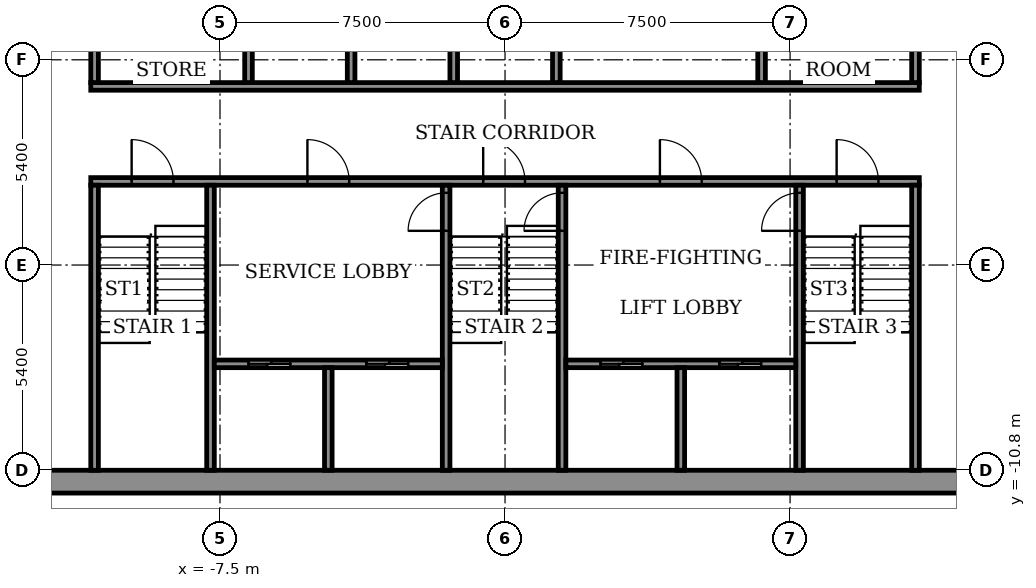
"""IFC4 building model, lengths in metres.
Left out: names, types, materials, properties, quantities, classifications, styles, units other than length and angle.
Written with IfcOpenShell. Run it as: python <this file> out.ifc"""

import sys

from ifc_helpers import new_model, si_unit, direction, frame, frame_2d, origin, place, context, subcontext, project, spatial, rectangle, extrude, element, fill, save


model = new_model("IFC4")
c1 = context("Model", 3, precision=1e-05, world=origin(), true_north=direction((0.0, 1.0)))
c2 = subcontext(c1, "Body", "Model", "MODEL_VIEW")
j1 = project(units=[si_unit("LENGTHUNIT", "METRE"), si_unit("PLANEANGLEUNIT", "RADIAN")], contexts=[c1])
p1 = place(None, origin())
s1 = spatial("IfcSite", under=j1, at=p1, CompositionType="ELEMENT")
p2 = place(p1, origin())
s2 = spatial("IfcBuilding", under=s1, at=p2, CompositionType="ELEMENT")
p3 = place(p2, frame((0.0, 0.0, 309.7)))
s3 = spatial("IfcBuildingStorey", under=s2, at=p3, CompositionType="ELEMENT", Elevation=309.7)
p4 = place(p3, frame((-14.4, -11.1, 0.0), z_axis=(0.0, 0.0, 1.0), x_axis=(1.0, 0.0, 0.0)))
e1 = element("IfcWall", 1, at=p4, inside=s3, PredefinedType="SHEAR", context=c2, shape_type="SweptSolid", body=[
    extrude(rectangle(XDim=28.8, YDim=0.6, at=frame_2d((14.4, 0.0))), origin(), (0.0, 0.0, 1.0), 3.6),
])
p5 = place(p3, frame((-10.9, -3.2, 0.0), z_axis=(0.0, 0.0, 1.0), x_axis=(1.0, 0.0, 0.0)))
e2 = element("IfcWall", 2, at=p5, inside=s3, PredefinedType="SHEAR", context=c2, shape_type="SweptSolid", body=[
    extrude(rectangle(XDim=21.8, YDim=0.2, at=frame_2d((10.9, 0.0))), origin(), (0.0, 0.0, 1.0), 3.05),
])
p6 = place(p5, frame((1.075, 0.0, 0.0)))
e3 = element("IfcOpeningElement", 3, at=p6, cuts=e2, PredefinedType="OPENING", context=c2, shape_type="SweptSolid", body=[
    extrude(rectangle(XDim=1.1, YDim=2.1, at=frame_2d((0.55, 1.05))), frame((0.0, 0.11, 0.0), z_axis=(0.0, -1.0, 0.0), x_axis=(1.0, 0.0, 0.0)), (0.0, 0.0, 1.0), 0.22),
])
p7 = place(p5, frame((10.325, 0.0, 0.0)))
e4 = element("IfcOpeningElement", 4, at=p7, cuts=e2, PredefinedType="OPENING", context=c2, shape_type="SweptSolid", body=[
    extrude(rectangle(XDim=1.1, YDim=2.1, at=frame_2d((0.55, 1.05))), frame((0.0, 0.11, 0.0), z_axis=(0.0, -1.0, 0.0), x_axis=(1.0, 0.0, 0.0)), (0.0, 0.0, 1.0), 0.22),
])
p8 = place(p5, frame((19.625, 0.0, 0.0)))
e5 = element("IfcOpeningElement", 5, at=p8, cuts=e2, PredefinedType="OPENING", context=c2, shape_type="SweptSolid", body=[
    extrude(rectangle(XDim=1.1, YDim=2.1, at=frame_2d((0.55, 1.05))), frame((0.0, 0.11, 0.0), z_axis=(0.0, -1.0, 0.0), x_axis=(1.0, 0.0, 0.0)), (0.0, 0.0, 1.0), 0.22),
])
p9 = place(p5, frame((5.7, 0.0, 0.0)))
e6 = element("IfcOpeningElement", 6, at=p9, cuts=e2, PredefinedType="OPENING", context=c2, shape_type="SweptSolid", body=[
    extrude(rectangle(XDim=1.1, YDim=2.1, at=frame_2d((0.55, 1.05))), frame((0.0, 0.11, 0.0), z_axis=(0.0, -1.0, 0.0), x_axis=(1.0, 0.0, 0.0)), (0.0, 0.0, 1.0), 0.22),
])
p10 = place(p5, frame((14.975, 0.0, 0.0)))
e7 = element("IfcOpeningElement", 7, at=p10, cuts=e2, PredefinedType="OPENING", context=c2, shape_type="SweptSolid", body=[
    extrude(rectangle(XDim=1.1, YDim=2.1, at=frame_2d((0.55, 1.05))), frame((0.0, 0.11, 0.0), z_axis=(0.0, -1.0, 0.0), x_axis=(1.0, 0.0, 0.0)), (0.0, 0.0, 1.0), 0.22),
])
p11 = place(p3, frame((-10.9, -0.7, 0.0), z_axis=(0.0, 0.0, 1.0), x_axis=(1.0, 0.0, 0.0)))
e8 = element("IfcWall", 8, at=p11, inside=s3, PredefinedType="SHEAR", context=c2, shape_type="SweptSolid", body=[
    extrude(rectangle(XDim=21.8, YDim=0.2, at=frame_2d((10.9, 0.0))), origin(), (0.0, 0.0, 1.0), 3.05),
])
for number, where, z_axis, x_axis in (
    (9, (-10.8, -10.8, 0.0), (0.0, 0.0, 1.0), (0.0, 1.0, 0.0)),
    (10, (-7.75, -10.8, 0.0), (0.0, 0.0, 1.0), (0.0, 1.0, 0.0)),
):
    element("IfcWall", number, at=place(p3, frame(where, z_axis=z_axis, x_axis=x_axis)), inside=s3, PredefinedType="SHEAR", context=c2, shape_type="SweptSolid", body=[
        extrude(rectangle(XDim=7.5, YDim=0.2, at=frame_2d((3.75, 0.0))), origin(), (0.0, 0.0, 1.0), 3.05),
    ])
p12 = place(p3, frame((-1.55, -10.8, 0.0), z_axis=(0.0, 0.0, 1.0), x_axis=(0.0, 1.0, 0.0)))
e11 = element("IfcWall", 11, at=p12, inside=s3, PredefinedType="SHEAR", context=c2, shape_type="SweptSolid", body=[
    extrude(rectangle(XDim=7.5, YDim=0.2, at=frame_2d((3.75, 0.0))), origin(), (0.0, 0.0, 1.0), 3.05),
])
p13 = place(p12, frame((6.3, 0.0, 0.0)))
e12 = element("IfcOpeningElement", 12, at=p13, cuts=e11, PredefinedType="OPENING", context=c2, shape_type="SweptSolid", body=[
    extrude(rectangle(XDim=1.0, YDim=2.1, at=frame_2d((0.5, 1.05))), frame((0.0, 0.11, 0.0), z_axis=(0.0, -1.0, 0.0), x_axis=(1.0, 0.0, 0.0)), (0.0, 0.0, 1.0), 0.22),
])
p14 = place(p3, frame((1.5, -10.8, 0.0), z_axis=(0.0, 0.0, 1.0), x_axis=(0.0, 1.0, 0.0)))
e13 = element("IfcWall", 13, at=p14, inside=s3, PredefinedType="SHEAR", context=c2, shape_type="SweptSolid", body=[
    extrude(rectangle(XDim=7.5, YDim=0.2, at=frame_2d((3.75, 0.0))), origin(), (0.0, 0.0, 1.0), 3.05),
])
p15 = place(p14, frame((6.3, 0.0, 0.0)))
e14 = element("IfcOpeningElement", 14, at=p15, cuts=e13, PredefinedType="OPENING", context=c2, shape_type="SweptSolid", body=[
    extrude(rectangle(XDim=1.0, YDim=2.1, at=frame_2d((0.5, 1.05))), frame((0.0, 0.11, 0.0), z_axis=(0.0, -1.0, 0.0), x_axis=(1.0, 0.0, 0.0)), (0.0, 0.0, 1.0), 0.22),
])
p16 = place(p3, frame((7.75, -10.8, 0.0), z_axis=(0.0, 0.0, 1.0), x_axis=(0.0, 1.0, 0.0)))
e15 = element("IfcWall", 15, at=p16, inside=s3, PredefinedType="SHEAR", context=c2, shape_type="SweptSolid", body=[
    extrude(rectangle(XDim=7.5, YDim=0.2, at=frame_2d((3.75, 0.0))), origin(), (0.0, 0.0, 1.0), 3.05),
])
p17 = place(p16, frame((6.3, 0.0, 0.0)))
e16 = element("IfcOpeningElement", 16, at=p17, cuts=e15, PredefinedType="OPENING", context=c2, shape_type="SweptSolid", body=[
    extrude(rectangle(XDim=1.0, YDim=2.1, at=frame_2d((0.5, 1.05))), frame((0.0, 0.11, 0.0), z_axis=(0.0, -1.0, 0.0), x_axis=(1.0, 0.0, 0.0)), (0.0, 0.0, 1.0), 0.22),
])
p18 = place(p3, frame((10.8, -10.8, 0.0), z_axis=(0.0, 0.0, 1.0), x_axis=(0.0, 1.0, 0.0)))
e17 = element("IfcWall", 17, at=p18, inside=s3, PredefinedType="SHEAR", context=c2, shape_type="SweptSolid", body=[
    extrude(rectangle(XDim=7.5, YDim=0.2, at=frame_2d((3.75, 0.0))), origin(), (0.0, 0.0, 1.0), 3.05),
])
p19 = place(p3, frame((-7.65, -8.0, 0.0), z_axis=(0.0, 0.0, 1.0), x_axis=(1.0, 0.0, 0.0)))
e18 = element("IfcWall", 18, at=p19, inside=s3, PredefinedType="SHEAR", context=c2, shape_type="SweptSolid", body=[
    extrude(rectangle(XDim=6.0, YDim=0.2, at=frame_2d((3.0, 0.0))), origin(), (0.0, 0.0, 1.0), 3.05),
])
p20 = place(p19, frame((0.9, 0.0, 0.0)))
e19 = element("IfcOpeningElement", 19, at=p20, cuts=e18, PredefinedType="OPENING", context=c2, shape_type="SweptSolid", body=[
    extrude(rectangle(XDim=1.1, YDim=2.1, at=frame_2d((0.55, 1.05))), frame((0.0, 0.11, 0.0), z_axis=(0.0, -1.0, 0.0), x_axis=(1.0, 0.0, 0.0)), (0.0, 0.0, 1.0), 0.22),
])
p21 = place(p19, frame((4.0, 0.0, 0.0)))
e20 = element("IfcOpeningElement", 20, at=p21, cuts=e18, PredefinedType="OPENING", context=c2, shape_type="SweptSolid", body=[
    extrude(rectangle(XDim=1.1, YDim=2.1, at=frame_2d((0.55, 1.05))), frame((0.0, 0.11, 0.0), z_axis=(0.0, -1.0, 0.0), x_axis=(1.0, 0.0, 0.0)), (0.0, 0.0, 1.0), 0.22),
])
p22 = place(p3, frame((-4.65, -10.8, 0.0), z_axis=(0.0, 0.0, 1.0), x_axis=(0.0, 1.0, 0.0)))
e21 = element("IfcWall", 21, at=p22, inside=s3, PredefinedType="SHEAR", context=c2, shape_type="SweptSolid", body=[
    extrude(rectangle(XDim=2.7, YDim=0.2, at=frame_2d((1.35, 0.0))), origin(), (0.0, 0.0, 1.0), 3.05),
])
p23 = place(p3, frame((1.6, -8.0, 0.0), z_axis=(0.0, 0.0, 1.0), x_axis=(1.0, 0.0, 0.0)))
e22 = element("IfcWall", 22, at=p23, inside=s3, PredefinedType="SHEAR", context=c2, shape_type="SweptSolid", body=[
    extrude(rectangle(XDim=6.05, YDim=0.2, at=frame_2d((3.025, 0.0))), origin(), (0.0, 0.0, 1.0), 3.05),
])
p24 = place(p23, frame((0.913, 0.0, 0.0)))
e23 = element("IfcOpeningElement", 23, at=p24, cuts=e22, PredefinedType="OPENING", context=c2, shape_type="SweptSolid", body=[
    extrude(rectangle(XDim=1.1, YDim=2.1, at=frame_2d((0.55, 1.05))), frame((0.0, 0.11, 0.0), z_axis=(0.0, -1.0, 0.0), x_axis=(1.0, 0.0, 0.0)), (0.0, 0.0, 1.0), 0.22),
])
p25 = place(p23, frame((4.038, 0.0, 0.0)))
e24 = element("IfcOpeningElement", 24, at=p25, cuts=e22, PredefinedType="OPENING", context=c2, shape_type="SweptSolid", body=[
    extrude(rectangle(XDim=1.1, YDim=2.1, at=frame_2d((0.55, 1.05))), frame((0.0, 0.11, 0.0), z_axis=(0.0, -1.0, 0.0), x_axis=(1.0, 0.0, 0.0)), (0.0, 0.0, 1.0), 0.22),
])
p26 = place(p3, frame((4.625, -10.8, 0.0), z_axis=(0.0, 0.0, 1.0), x_axis=(0.0, 1.0, 0.0)))
e25 = element("IfcWall", 25, at=p26, inside=s3, PredefinedType="SHEAR", context=c2, shape_type="SweptSolid", body=[
    extrude(rectangle(XDim=2.7, YDim=0.2, at=frame_2d((1.35, 0.0))), origin(), (0.0, 0.0, 1.0), 3.05),
])
p27 = place(p3, frame((-10.8, -0.6, 0.0), z_axis=(0.0, 0.0, 1.0), x_axis=(0.0, 1.0, 0.0)))
e26 = element("IfcWall", 26, at=p27, inside=s3, PredefinedType="STANDARD", context=c2, shape_type="SweptSolid", body=[
    extrude(rectangle(XDim=2.5, YDim=0.2, at=frame_2d((1.25, 0.0))), origin(), (0.0, 0.0, 1.0), 3.05),
])
for number, where, z_axis, x_axis in (
    (27, (-6.75, -0.6, 0.0), (0.0, 0.0, 1.0), (0.0, 1.0, 0.0)),
    (28, (-4.05, -0.6, 0.0), (0.0, 0.0, 1.0), (0.0, 1.0, 0.0)),
    (29, (-1.35, -0.6, 0.0), (0.0, 0.0, 1.0), (0.0, 1.0, 0.0)),
    (30, (1.35, -0.6, 0.0), (0.0, 0.0, 1.0), (0.0, 1.0, 0.0)),
):
    element("IfcWall", number, at=place(p3, frame(where, z_axis=z_axis, x_axis=x_axis)), inside=s3, PredefinedType="SHEAR", context=c2, shape_type="SweptSolid", body=[
        extrude(rectangle(XDim=2.5, YDim=0.2, at=frame_2d((1.25, 0.0))), origin(), (0.0, 0.0, 1.0), 3.05),
    ])
for number, where, z_axis, x_axis in (
    (31, (6.75, -0.6, 0.0), (0.0, 0.0, 1.0), (0.0, 1.0, 0.0)),
    (32, (10.8, -0.6, 0.0), (0.0, 0.0, 1.0), (0.0, 1.0, 0.0)),
):
    element("IfcWall", number, at=place(p3, frame(where, z_axis=z_axis, x_axis=x_axis)), inside=s3, PredefinedType="STANDARD", context=c2, shape_type="SweptSolid", body=[
        extrude(rectangle(XDim=2.5, YDim=0.2, at=frame_2d((1.25, 0.0))), origin(), (0.0, 0.0, 1.0), 3.05),
    ])
p28 = place(p24, origin())
e33 = element("IfcDoor", 33, at=p28, inside=s3, OperationType="SLIDING_TO_LEFT", PredefinedType="DOOR", context=c2, shape_type="SweptSolid", body=[
    extrude(rectangle(XDim=1.1, YDim=2.1, at=frame_2d((0.55, 1.05))), frame((0.0, 0.025, 0.0), z_axis=(0.0, -1.0, 0.0), x_axis=(1.0, 0.0, 0.0)), (0.0, 0.0, 1.0), 0.05),
])
fill(e23, e33)
p29 = place(p20, origin())
e34 = element("IfcDoor", 34, at=p29, inside=s3, OperationType="SLIDING_TO_LEFT", PredefinedType="DOOR", context=c2, shape_type="SweptSolid", body=[
    extrude(rectangle(XDim=1.1, YDim=2.1, at=frame_2d((0.55, 1.05))), frame((0.0, 0.025, 0.0), z_axis=(0.0, -1.0, 0.0), x_axis=(1.0, 0.0, 0.0)), (0.0, 0.0, 1.0), 0.05),
])
fill(e19, e34)
p30 = place(p25, origin())
e35 = element("IfcDoor", 35, at=p30, inside=s3, OperationType="SLIDING_TO_LEFT", PredefinedType="DOOR", context=c2, shape_type="SweptSolid", body=[
    extrude(rectangle(XDim=1.1, YDim=2.1, at=frame_2d((0.55, 1.05))), frame((0.0, 0.025, 0.0), z_axis=(0.0, -1.0, 0.0), x_axis=(1.0, 0.0, 0.0)), (0.0, 0.0, 1.0), 0.05),
])
fill(e24, e35)
p31 = place(p21, origin())
e36 = element("IfcDoor", 36, at=p31, inside=s3, OperationType="SLIDING_TO_LEFT", PredefinedType="DOOR", context=c2, shape_type="SweptSolid", body=[
    extrude(rectangle(XDim=1.1, YDim=2.1, at=frame_2d((0.55, 1.05))), frame((0.0, 0.025, 0.0), z_axis=(0.0, -1.0, 0.0), x_axis=(1.0, 0.0, 0.0)), (0.0, 0.0, 1.0), 0.05),
])
fill(e20, e36)
p32 = place(p6, origin())
e37 = element("IfcDoor", 37, at=p32, inside=s3, OperationType="SINGLE_SWING_RIGHT", PredefinedType="DOOR", context=c2, shape_type="SweptSolid", body=[
    extrude(rectangle(XDim=1.1, YDim=2.1, at=frame_2d((0.55, 1.05))), frame((0.0, 0.025, 0.0), z_axis=(0.0, -1.0, 0.0), x_axis=(1.0, 0.0, 0.0)), (0.0, 0.0, 1.0), 0.05),
])
fill(e3, e37)
p33 = place(p7, origin())
e38 = element("IfcDoor", 38, at=p33, inside=s3, OperationType="SINGLE_SWING_RIGHT", PredefinedType="DOOR", context=c2, shape_type="SweptSolid", body=[
    extrude(rectangle(XDim=1.1, YDim=2.1, at=frame_2d((0.55, 1.05))), frame((0.0, 0.025, 0.0), z_axis=(0.0, -1.0, 0.0), x_axis=(1.0, 0.0, 0.0)), (0.0, 0.0, 1.0), 0.05),
])
fill(e4, e38)
p34 = place(p8, origin())
e39 = element("IfcDoor", 39, at=p34, inside=s3, OperationType="SINGLE_SWING_RIGHT", PredefinedType="DOOR", context=c2, shape_type="SweptSolid", body=[
    extrude(rectangle(XDim=1.1, YDim=2.1, at=frame_2d((0.55, 1.05))), frame((0.0, 0.025, 0.0), z_axis=(0.0, -1.0, 0.0), x_axis=(1.0, 0.0, 0.0)), (0.0, 0.0, 1.0), 0.05),
])
fill(e5, e39)
p35 = place(p9, origin())
e40 = element("IfcDoor", 40, at=p35, inside=s3, OperationType="SINGLE_SWING_LEFT", PredefinedType="DOOR", context=c2, shape_type="SweptSolid", body=[
    extrude(rectangle(XDim=1.1, YDim=2.1, at=frame_2d((0.55, 1.05))), frame((0.0, 0.025, 0.0), z_axis=(0.0, -1.0, 0.0), x_axis=(1.0, 0.0, 0.0)), (0.0, 0.0, 1.0), 0.05),
])
fill(e6, e40)
p36 = place(p10, origin())
e41 = element("IfcDoor", 41, at=p36, inside=s3, OperationType="SINGLE_SWING_LEFT", PredefinedType="DOOR", context=c2, shape_type="SweptSolid", body=[
    extrude(rectangle(XDim=1.1, YDim=2.1, at=frame_2d((0.55, 1.05))), frame((0.0, 0.025, 0.0), z_axis=(0.0, -1.0, 0.0), x_axis=(1.0, 0.0, 0.0)), (0.0, 0.0, 1.0), 0.05),
])
fill(e7, e41)
p37 = place(p13, origin())
e42 = element("IfcDoor", 42, at=p37, inside=s3, OperationType="SINGLE_SWING_RIGHT", PredefinedType="DOOR", context=c2, shape_type="SweptSolid", body=[
    extrude(rectangle(XDim=1.0, YDim=2.1, at=frame_2d((0.5, 1.05))), frame((0.0, 0.025, 0.0), z_axis=(0.0, -1.0, 0.0), x_axis=(1.0, 0.0, 0.0)), (0.0, 0.0, 1.0), 0.05),
])
fill(e12, e42)
p38 = place(p15, origin())
e43 = element("IfcDoor", 43, at=p38, inside=s3, OperationType="SINGLE_SWING_RIGHT", PredefinedType="DOOR", context=c2, shape_type="SweptSolid", body=[
    extrude(rectangle(XDim=1.0, YDim=2.1, at=frame_2d((0.5, 1.05))), frame((0.0, 0.025, 0.0), z_axis=(0.0, -1.0, 0.0), x_axis=(1.0, 0.0, 0.0)), (0.0, 0.0, 1.0), 0.05),
])
fill(e14, e43)
p39 = place(p17, origin())
e44 = element("IfcDoor", 44, at=p39, inside=s3, OperationType="SINGLE_SWING_RIGHT", PredefinedType="DOOR", context=c2, shape_type="SweptSolid", body=[
    extrude(rectangle(XDim=1.0, YDim=2.1, at=frame_2d((0.5, 1.05))), frame((0.0, 0.025, 0.0), z_axis=(0.0, -1.0, 0.0), x_axis=(1.0, 0.0, 0.0)), (0.0, 0.0, 1.0), 0.05),
])
fill(e16, e44)
save(model, sys.argv[1])
